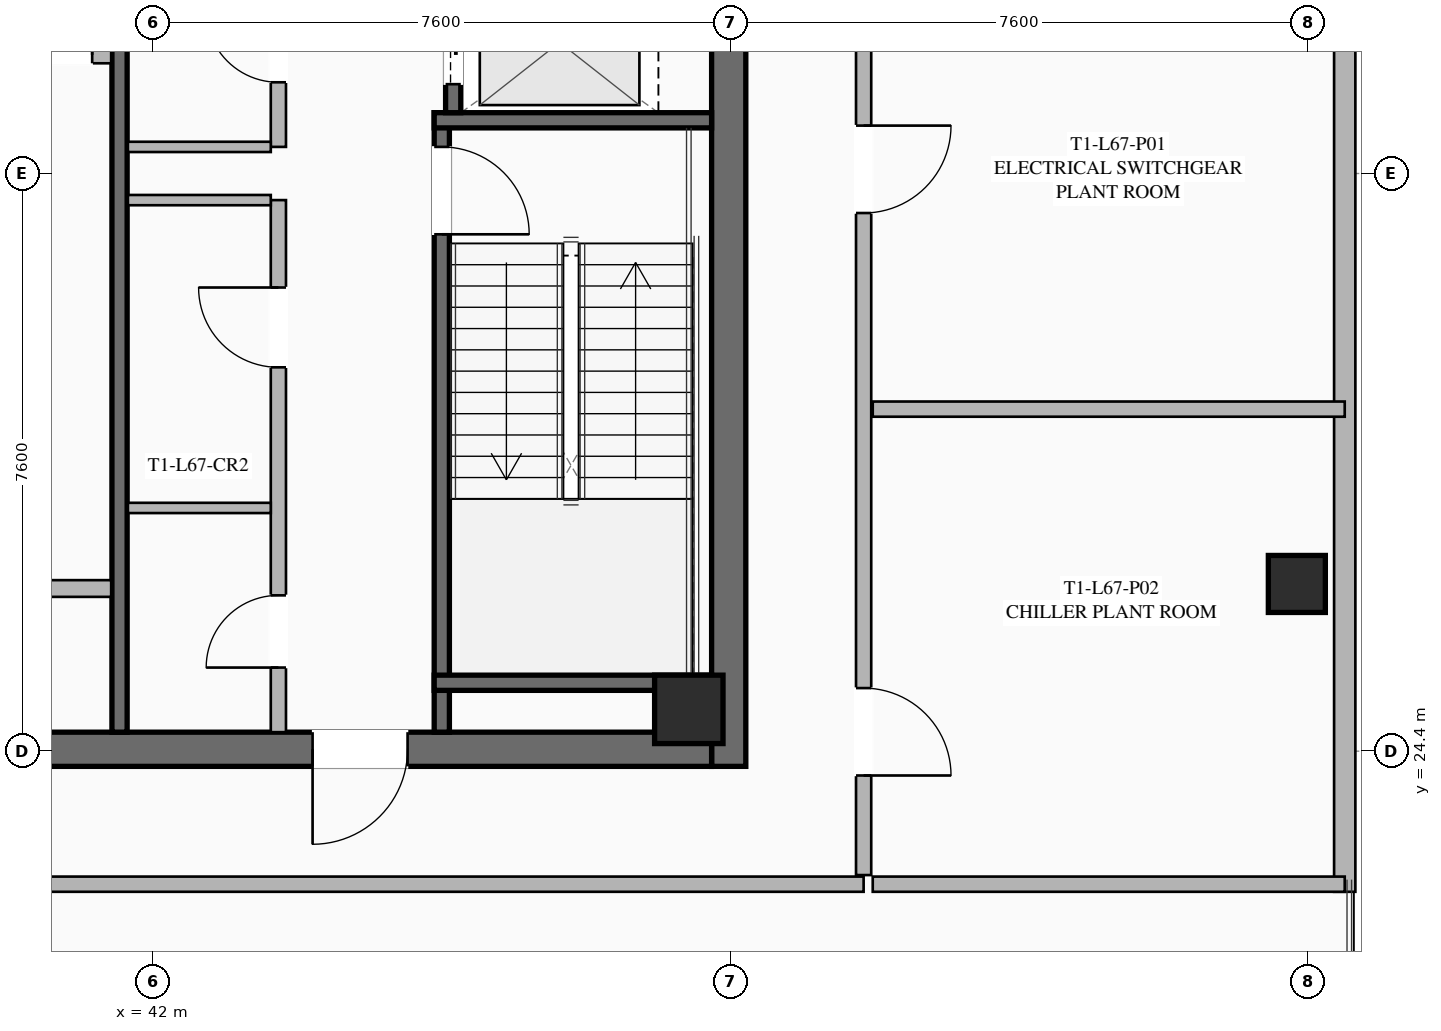
"""IFC4 building model, lengths in metres.
Left out: names, types, materials, properties, quantities, classifications, styles, units other than length and angle.
Written with IfcOpenShell. Run it as: python <this file> out.ifc"""

import sys

from ifc_helpers import new_model, si_unit, direction, frame, frame_2d, origin, origin_2d, place, context, subcontext, project, spatial, rectangle, hollow_rectangle, extrude, element, fill, save


model = new_model("IFC4")
c1 = context("Model", 3, precision=1e-05, world=origin(), true_north=direction((0.0, 1.0)))
c2 = subcontext(c1, "Body", "Model", "MODEL_VIEW")
j1 = project(units=[si_unit("LENGTHUNIT", "METRE"), si_unit("PLANEANGLEUNIT", "RADIAN")], contexts=[c1])
p1 = place(None, origin())
s1 = spatial("IfcSite", under=j1, at=p1, CompositionType="ELEMENT")
p2 = place(p1, origin())
s2 = spatial("IfcBuilding", under=s1, at=p2, CompositionType="ELEMENT")
p3 = place(p2, frame((0.0, 0.0, 246.8)))
s3 = spatial("IfcBuildingStorey", under=s2, at=p3, CompositionType="ELEMENT", Elevation=246.8)
p4 = place(p3, frame((49.575, 39.8, 0.0), z_axis=(0.0, 0.0, 1.0), x_axis=(0.0, -1.0, 0.0)))
e1 = element("IfcWall", 1, at=p4, inside=s3, PredefinedType="SHEAR", context=c2, shape_type="SweptSolid", body=[
    extrude(rectangle(XDim=15.6, YDim=0.45, at=frame_2d((7.8, 0.0))), origin(), (0.0, 0.0, 1.0), 4.6),
])
p5 = place(p3, frame((49.35, 24.425, 0.0), z_axis=(0.0, 0.0, 1.0), x_axis=(-1.0, 0.0, 0.0)))
e2 = element("IfcWall", 2, at=p5, inside=s3, PredefinedType="SHEAR", context=c2, shape_type="SweptSolid", body=[
    extrude(rectangle(XDim=14.7, YDim=0.45, at=frame_2d((7.35, 0.0))), origin(), (0.0, 0.0, 1.0), 4.6),
])
p6 = place(p5, frame((9.05, 0.0, 0.0)))
e3 = element("IfcOpeningElement", 3, at=p6, cuts=e2, PredefinedType="OPENING", context=c2, shape_type="SweptSolid", body=[
    extrude(rectangle(XDim=1.25, YDim=2.25, at=frame_2d((0.625, 1.125))), frame((0.0, 0.235, 0.0), z_axis=(0.0, -1.0, 0.0), x_axis=(1.0, 0.0, 0.0)), (0.0, 0.0, 1.0), 0.47),
])
p7 = place(p5, frame((4.0, 0.0, 0.0)))
e4 = element("IfcOpeningElement", 4, at=p7, cuts=e2, PredefinedType="OPENING", context=c2, shape_type="SweptSolid", body=[
    extrude(rectangle(XDim=1.25, YDim=2.25, at=frame_2d((0.625, 1.125))), frame((0.0, 0.235, 0.0), z_axis=(0.0, -1.0, 0.0), x_axis=(1.0, 0.0, 0.0)), (0.0, 0.0, 1.0), 0.47),
])
p8 = place(p3, frame((49.05, 24.95, 0.0), z_axis=(0.0, 0.0, 1.0), x_axis=(1.0, 0.0, 0.0)))
e5 = element("IfcColumn", 5, at=p8, inside=s3, PredefinedType="COLUMN", context=c2, shape_type="SweptSolid", body=[
    extrude(hollow_rectangle(XDim=0.9, YDim=0.9, WallThickness=0.04, at=origin_2d()), origin(), (0.0, 0.0, 1.0), 4.38),
])
p9 = place(p3, frame((57.05, 26.6, 0.0), z_axis=(0.0, 0.0, 1.0), x_axis=(1.0, 0.0, 0.0)))
e6 = element("IfcColumn", 6, at=p9, inside=s3, PredefinedType="COLUMN", context=c2, shape_type="SweptSolid", body=[
    extrude(hollow_rectangle(XDim=0.75, YDim=0.75, WallThickness=0.032, at=origin_2d()), origin(), (0.0, 0.0, 1.0), 4.38),
])
p10 = place(p3, frame((57.68, 41.45, 0.0), z_axis=(0.0, 0.0, 1.0), x_axis=(0.0, -1.0, 0.0)))
e7 = element("IfcWall", 7, at=p10, inside=s3, PredefinedType="SOLIDWALL", context=c2, shape_type="SweptSolid", body=[
    extrude(rectangle(XDim=18.9, YDim=0.28, at=frame_2d((9.45, 0.0))), origin(), (0.0, 0.0, 1.0), 4.38),
])
p11 = place(p3, frame((45.8, 32.8, 0.0), z_axis=(0.0, 0.0, 1.0), x_axis=(0.0, -1.0, 0.0)))
e8 = element("IfcWall", 8, at=p11, inside=s3, PredefinedType="SHEAR", context=c2, shape_type="SweptSolid", body=[
    extrude(rectangle(XDim=8.15, YDim=0.2, at=frame_2d((4.075, 0.0))), origin(), (0.0, 0.0, 1.0), 4.38),
])
p12 = place(p11, frame((0.45, 0.0, 0.0)))
e9 = element("IfcOpeningElement", 9, at=p12, cuts=e8, PredefinedType="OPENING", context=c2, shape_type="SweptSolid", body=[
    extrude(rectangle(XDim=1.15, YDim=2.2, at=frame_2d((0.575, 1.1))), frame((0.0, 0.11, 0.0), z_axis=(0.0, -1.0, 0.0), x_axis=(1.0, 0.0, 0.0)), (0.0, 0.0, 1.0), 0.22),
])
for number, where, z_axis, x_axis in (
    (10, (45.7, 32.7, 0.0), (0.0, 0.0, 1.0), (1.0, 0.0, 0.0)),
    (11, (45.7, 25.3, 0.0), (0.0, 0.0, 1.0), (1.0, 0.0, 0.0)),
):
    element("IfcWall", number, at=place(p3, frame(where, z_axis=z_axis, x_axis=x_axis)), inside=s3, PredefinedType="SHEAR", context=c2, shape_type="SweptSolid", body=[
        extrude(rectangle(XDim=3.65, YDim=0.2, at=frame_2d((1.825, 0.0))), origin(), (0.0, 0.0, 1.0), 4.38),
    ])
p13 = place(p3, frame((41.56, 24.65, 0.0), z_axis=(0.0, 0.0, 1.0), x_axis=(0.0, 1.0, 0.0)))
e12 = element("IfcWall", 12, at=p13, inside=s3, PredefinedType="SHEAR", context=c2, shape_type="SweptSolid", body=[
    extrude(rectangle(XDim=14.7, YDim=0.2, at=frame_2d((7.35, 0.0))), origin(), (0.0, 0.0, 1.0), 4.38),
])
p14 = place(p3, frame((38.3, 33.56, 0.0), z_axis=(0.0, 0.0, 1.0), x_axis=(1.0, 0.0, 0.0)))
e13 = element("IfcWall", 13, at=p14, inside=s3, PredefinedType="SOLIDWALL", context=c2, shape_type="SweptSolid", body=[
    extrude(rectangle(XDim=3.15, YDim=0.22, at=frame_2d((1.575, 0.0))), origin(), (0.0, 0.0, 1.0), 3.491),
])
p15 = place(p14, frame((0.25, 0.0, 0.0)))
e14 = element("IfcOpeningElement", 14, at=p15, cuts=e13, PredefinedType="OPENING", context=c2, shape_type="SweptSolid", body=[
    extrude(rectangle(XDim=0.95, YDim=2.05, at=frame_2d((0.475, 1.025))), frame((0.0, 0.12, 0.0), z_axis=(0.0, -1.0, 0.0), x_axis=(1.0, 0.0, 0.0)), (0.0, 0.0, 1.0), 0.24),
])
p16 = place(p14, frame((1.95, 0.0, 0.0)))
e15 = element("IfcOpeningElement", 15, at=p16, cuts=e13, PredefinedType="OPENING", context=c2, shape_type="SweptSolid", body=[
    extrude(rectangle(XDim=0.95, YDim=2.05, at=frame_2d((0.475, 1.025))), frame((0.0, 0.12, 0.0), z_axis=(0.0, -1.0, 0.0), x_axis=(1.0, 0.0, 0.0)), (0.0, 0.0, 1.0), 0.24),
])
p17 = place(p3, frame((38.3, 26.54, 0.0), z_axis=(0.0, 0.0, 1.0), x_axis=(1.0, 0.0, 0.0)))
e16 = element("IfcWall", 16, at=p17, inside=s3, PredefinedType="SOLIDWALL", context=c2, shape_type="SweptSolid", body=[
    extrude(rectangle(XDim=3.15, YDim=0.22, at=frame_2d((1.575, 0.0))), origin(), (0.0, 0.0, 1.0), 3.491),
])
p18 = place(p17, frame((0.95, 0.0, 0.0)))
e17 = element("IfcOpeningElement", 17, at=p18, cuts=e16, PredefinedType="OPENING", context=c2, shape_type="SweptSolid", body=[
    extrude(rectangle(XDim=1.25, YDim=2.25, at=frame_2d((0.625, 1.125))), frame((0.0, 0.12, 0.0), z_axis=(0.0, -1.0, 0.0), x_axis=(1.0, 0.0, 0.0)), (0.0, 0.0, 1.0), 0.24),
])
p19 = place(p3, frame((45.95, 39.35, 0.0), z_axis=(0.0, 0.0, 1.0), x_axis=(0.0, -1.0, 0.0)))
e18 = element("IfcWall", 18, at=p19, inside=s3, PredefinedType="SHEAR", context=c2, shape_type="SweptSolid", body=[
    extrude(rectangle(XDim=6.55, YDim=0.2, at=frame_2d((3.275, 0.0))), origin(), (0.0, 0.0, 1.0), 4.38),
])
p20 = place(p19, frame((5.075, 0.0, 0.0)))
e19 = element("IfcOpeningElement", 19, at=p20, cuts=e18, PredefinedType="OPENING", context=c2, shape_type="SweptSolid", body=[
    extrude(rectangle(XDim=1.1, YDim=2.2, at=frame_2d((0.55, 1.1))), frame((0.0, 0.11, 0.0), z_axis=(0.0, -1.0, 0.0), x_axis=(1.0, 0.0, 0.0)), (0.0, 0.0, 1.0), 0.22),
])
p21 = place(p19, frame((3.025, 0.0, 0.0)))
e20 = element("IfcOpeningElement", 20, at=p21, cuts=e18, PredefinedType="OPENING", context=c2, shape_type="SweptSolid", body=[
    extrude(rectangle(XDim=1.1, YDim=2.2, at=frame_2d((0.55, 1.1))), frame((0.0, 0.11, 0.0), z_axis=(0.0, -1.0, 0.0), x_axis=(1.0, 0.0, 0.0)), (0.0, 0.0, 1.0), 0.22),
])
p22 = place(p19, frame((1.025, 0.0, 0.0)))
e21 = element("IfcOpeningElement", 21, at=p22, cuts=e18, PredefinedType="OPENING", context=c2, shape_type="SweptSolid", body=[
    extrude(rectangle(XDim=1.1, YDim=2.2, at=frame_2d((0.55, 1.1))), frame((0.0, 0.11, 0.0), z_axis=(0.0, -1.0, 0.0), x_axis=(1.0, 0.0, 0.0)), (0.0, 0.0, 1.0), 0.22),
])
p23 = place(p3, frame((43.65, 24.65, 0.0), z_axis=(0.0, 0.0, 1.0), x_axis=(0.0, 1.0, 0.0)))
e22 = element("IfcWall", 22, at=p23, inside=s3, PredefinedType="SOLIDWALL", context=c2, shape_type="SweptSolid", body=[
    extrude(rectangle(XDim=7.0, YDim=0.2, at=frame_2d((3.5, 0.0))), origin(), (0.0, 0.0, 1.0), 3.491),
])
p24 = place(p23, frame((0.85, 0.0, 0.0)))
e23 = element("IfcOpeningElement", 23, at=p24, cuts=e22, PredefinedType="OPENING", context=c2, shape_type="SweptSolid", body=[
    extrude(rectangle(XDim=0.95, YDim=2.05, at=frame_2d((0.475, 1.025))), frame((0.0, 0.11, 0.0), z_axis=(0.0, -1.0, 0.0), x_axis=(1.0, 0.0, 0.0)), (0.0, 0.0, 1.0), 0.22),
])
p25 = place(p23, frame((4.8, 0.0, 0.0)))
e24 = element("IfcOpeningElement", 24, at=p25, cuts=e22, PredefinedType="OPENING", context=c2, shape_type="SweptSolid", body=[
    extrude(rectangle(XDim=1.05, YDim=2.2, at=frame_2d((0.525, 1.1))), frame((0.0, 0.11, 0.0), z_axis=(0.0, -1.0, 0.0), x_axis=(1.0, 0.0, 0.0)), (0.0, 0.0, 1.0), 0.22),
])
for number, where, z_axis, x_axis in (
    (25, (41.67, 31.65, 0.0), (0.0, 0.0, 1.0), (1.0, 0.0, 0.0)),
    (26, (41.67, 27.6, 0.0), (0.0, 0.0, 1.0), (1.0, 0.0, 0.0)),
):
    element("IfcWall", number, at=place(p3, frame(where, z_axis=z_axis, x_axis=x_axis)), inside=s3, PredefinedType="PARTITIONING", context=c2, shape_type="SweptSolid", body=[
        extrude(rectangle(XDim=1.88, YDim=0.135, at=frame_2d((0.94, 0.0))), origin(), (0.0, 0.0, 1.0), 3.491),
    ])
p26 = place(p3, frame((43.65, 32.35, 0.0), z_axis=(0.0, 0.0, 1.0), x_axis=(0.0, 1.0, 0.0)))
e27 = element("IfcWall", 27, at=p26, inside=s3, PredefinedType="SOLIDWALL", context=c2, shape_type="SweptSolid", body=[
    extrude(rectangle(XDim=7.0, YDim=0.2, at=frame_2d((3.5, 0.0))), origin(), (0.0, 0.0, 1.0), 3.491),
])
p27 = place(p26, frame((0.85, 0.0, 0.0)))
e28 = element("IfcOpeningElement", 28, at=p27, cuts=e27, PredefinedType="OPENING", context=c2, shape_type="SweptSolid", body=[
    extrude(rectangle(XDim=0.95, YDim=2.05, at=frame_2d((0.475, 1.025))), frame((0.0, 0.11, 0.0), z_axis=(0.0, -1.0, 0.0), x_axis=(1.0, 0.0, 0.0)), (0.0, 0.0, 1.0), 0.22),
])
p28 = place(p26, frame((4.85, 0.0, 0.0)))
e29 = element("IfcOpeningElement", 29, at=p28, cuts=e27, PredefinedType="OPENING", context=c2, shape_type="SweptSolid", body=[
    extrude(rectangle(XDim=0.95, YDim=2.05, at=frame_2d((0.475, 1.025))), frame((0.0, 0.11, 0.0), z_axis=(0.0, -1.0, 0.0), x_axis=(1.0, 0.0, 0.0)), (0.0, 0.0, 1.0), 0.22),
])
p29 = place(p3, frame((41.67, 32.35, 0.0), z_axis=(0.0, 0.0, 1.0), x_axis=(1.0, 0.0, 0.0)))
e30 = element("IfcWall", 30, at=p29, inside=s3, PredefinedType="PARTITIONING", context=c2, shape_type="SweptSolid", body=[
    extrude(rectangle(XDim=1.88, YDim=0.135, at=frame_2d((0.94, 0.0))), origin(), (0.0, 0.0, 1.0), 3.491),
])
p30 = place(p3, frame((51.35, 22.65, 0.0), z_axis=(0.0, 0.0, 1.0), x_axis=(-1.0, 0.0, 0.0)))
e31 = element("IfcWall", 31, at=p30, inside=s3, PredefinedType="SOLIDWALL", context=c2, shape_type="SweptSolid", body=[
    extrude(rectangle(XDim=18.7, YDim=0.2, at=frame_2d((9.35, 0.0))), origin(), (0.0, 0.0, 1.0), 3.491),
])
p31 = place(p3, frame((51.35, 41.23, 0.0), z_axis=(0.0, 0.0, 1.0), x_axis=(0.0, -1.0, 0.0)))
e32 = element("IfcWall", 32, at=p31, inside=s3, PredefinedType="SOLIDWALL", context=c2, shape_type="SweptSolid", body=[
    extrude(rectangle(XDim=18.46, YDim=0.2, at=frame_2d((9.23, 0.0))), origin(), (0.0, 0.0, 1.0), 3.491),
])
p32 = place(p31, frame((2.2, 0.0, 0.0)))
e33 = element("IfcOpeningElement", 33, at=p32, cuts=e32, PredefinedType="OPENING", context=c2, shape_type="SweptSolid", body=[
    extrude(rectangle(XDim=1.25, YDim=2.25, at=frame_2d((0.625, 1.125))), frame((0.0, 0.11, 0.0), z_axis=(0.0, -1.0, 0.0), x_axis=(1.0, 0.0, 0.0)), (0.0, 0.0, 1.0), 0.22),
])
p33 = place(p31, frame((8.6, 0.0, 0.0)))
e34 = element("IfcOpeningElement", 34, at=p33, cuts=e32, PredefinedType="OPENING", context=c2, shape_type="SweptSolid", body=[
    extrude(rectangle(XDim=1.15, YDim=2.2, at=frame_2d((0.575, 1.1))), frame((0.0, 0.11, 0.0), z_axis=(0.0, -1.0, 0.0), x_axis=(1.0, 0.0, 0.0)), (0.0, 0.0, 1.0), 0.22),
])
p34 = place(p31, frame((16.0, 0.0, 0.0)))
e35 = element("IfcOpeningElement", 35, at=p34, cuts=e32, PredefinedType="OPENING", context=c2, shape_type="SweptSolid", body=[
    extrude(rectangle(XDim=1.15, YDim=2.2, at=frame_2d((0.575, 1.1))), frame((0.0, 0.11, 0.0), z_axis=(0.0, -1.0, 0.0), x_axis=(1.0, 0.0, 0.0)), (0.0, 0.0, 1.0), 0.22),
])
for number, where, z_axis, x_axis in (
    (36, (51.47, 22.65, 0.0), (0.0, 0.0, 1.0), (1.0, 0.0, 0.0)),
    (37, (51.47, 28.9, 0.0), (0.0, 0.0, 1.0), (1.0, 0.0, 0.0)),
):
    element("IfcWall", number, at=place(p3, frame(where, z_axis=z_axis, x_axis=x_axis)), inside=s3, PredefinedType="SOLIDWALL", context=c2, shape_type="SweptSolid", body=[
        extrude(rectangle(XDim=6.21, YDim=0.2, at=frame_2d((3.105, 0.0))), origin(), (0.0, 0.0, 1.0), 3.491),
    ])
p35 = place(p7, origin())
e38 = element("IfcDoor", 38, at=p35, inside=s3, OperationType="SINGLE_SWING_RIGHT", PredefinedType="DOOR", context=c2, shape_type="SweptSolid", body=[
    extrude(rectangle(XDim=1.25, YDim=2.25, at=frame_2d((0.625, 1.125))), frame((0.0, 0.025, 0.0), z_axis=(0.0, -1.0, 0.0), x_axis=(1.0, 0.0, 0.0)), (0.0, 0.0, 1.0), 0.05),
])
fill(e4, e38)
p36 = place(p12, origin())
e39 = element("IfcDoor", 39, at=p36, inside=s3, OperationType="SINGLE_SWING_RIGHT", PredefinedType="DOOR", context=c2, shape_type="SweptSolid", body=[
    extrude(rectangle(XDim=1.15, YDim=2.2, at=frame_2d((0.575, 1.1))), frame((0.0, 0.025, 0.0), z_axis=(0.0, -1.0, 0.0), x_axis=(1.0, 0.0, 0.0)), (0.0, 0.0, 1.0), 0.05),
])
fill(e9, e39)
p37 = place(p16, origin())
e40 = element("IfcDoor", 40, at=p37, inside=s3, OperationType="SINGLE_SWING_RIGHT", PredefinedType="DOOR", context=c2, shape_type="SweptSolid", body=[
    extrude(rectangle(XDim=0.95, YDim=2.05, at=frame_2d((0.475, 1.025))), frame((0.0, 0.025, 0.0), z_axis=(0.0, -1.0, 0.0), x_axis=(1.0, 0.0, 0.0)), (0.0, 0.0, 1.0), 0.05),
])
fill(e15, e40)
p38 = place(p24, origin())
e41 = element("IfcDoor", 41, at=p38, inside=s3, OperationType="SINGLE_SWING_LEFT", PredefinedType="DOOR", context=c2, shape_type="SweptSolid", body=[
    extrude(rectangle(XDim=0.95, YDim=2.05, at=frame_2d((0.475, 1.025))), frame((0.0, 0.025, 0.0), z_axis=(0.0, -1.0, 0.0), x_axis=(1.0, 0.0, 0.0)), (0.0, 0.0, 1.0), 0.05),
])
fill(e23, e41)
p39 = place(p25, origin())
e42 = element("IfcDoor", 42, at=p39, inside=s3, OperationType="SINGLE_SWING_RIGHT", PredefinedType="DOOR", context=c2, shape_type="SweptSolid", body=[
    extrude(rectangle(XDim=1.05, YDim=2.2, at=frame_2d((0.525, 1.1))), frame((0.0, 0.025, 0.0), z_axis=(0.0, -1.0, 0.0), x_axis=(1.0, 0.0, 0.0)), (0.0, 0.0, 1.0), 0.05),
])
fill(e24, e42)
p40 = place(p27, origin())
e43 = element("IfcDoor", 43, at=p40, inside=s3, OperationType="SINGLE_SWING_RIGHT", PredefinedType="DOOR", context=c2, shape_type="SweptSolid", body=[
    extrude(rectangle(XDim=0.95, YDim=2.05, at=frame_2d((0.475, 1.025))), frame((0.0, 0.025, 0.0), z_axis=(0.0, -1.0, 0.0), x_axis=(1.0, 0.0, 0.0)), (0.0, 0.0, 1.0), 0.05),
])
fill(e28, e43)
p41 = place(p33, origin())
e44 = element("IfcDoor", 44, at=p41, inside=s3, OperationType="SINGLE_SWING_LEFT", PredefinedType="DOOR", context=c2, shape_type="SweptSolid", body=[
    extrude(rectangle(XDim=1.15, YDim=2.2, at=frame_2d((0.575, 1.1))), frame((0.0, 0.025, 0.0), z_axis=(0.0, -1.0, 0.0), x_axis=(1.0, 0.0, 0.0)), (0.0, 0.0, 1.0), 0.05),
])
fill(e34, e44)
p42 = place(p34, origin())
e45 = element("IfcDoor", 45, at=p42, inside=s3, OperationType="SINGLE_SWING_RIGHT", PredefinedType="DOOR", context=c2, shape_type="SweptSolid", body=[
    extrude(rectangle(XDim=1.15, YDim=2.2, at=frame_2d((0.575, 1.1))), frame((0.0, 0.025, 0.0), z_axis=(0.0, -1.0, 0.0), x_axis=(1.0, 0.0, 0.0)), (0.0, 0.0, 1.0), 0.05),
])
fill(e35, e45)
p43 = place(p20, origin())
e46 = element("IfcDoor", 46, at=p43, inside=s3, OperationType="SLIDING_TO_LEFT", PredefinedType="DOOR", context=c2, shape_type="SweptSolid", body=[
    extrude(rectangle(XDim=1.1, YDim=2.2, at=frame_2d((0.55, 1.1))), frame((0.0, 0.025, 0.0), z_axis=(0.0, -1.0, 0.0), x_axis=(1.0, 0.0, 0.0)), (0.0, 0.0, 1.0), 0.05),
])
fill(e19, e46)
save(model, sys.argv[1])
